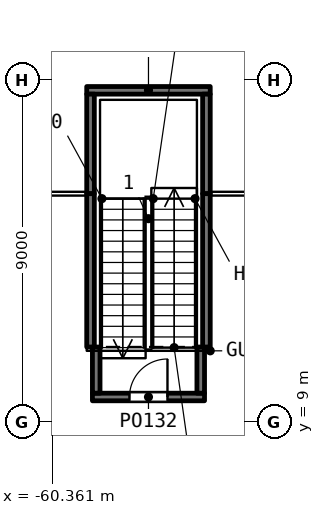
"""IFC4 building model, lengths in metres.
Left out: names, types, materials, properties, quantities, classifications, styles, units other than length and angle.
Written with IfcOpenShell. Run it as: python <this file> out.ifc"""

import sys

from ifc_helpers import new_model, si_unit, direction, frame, frame_2d, origin, place, context, subcontext, project, spatial, rectangle, extrude, element, fill, save


model = new_model("IFC4")
c1 = context("Model", 3, precision=1e-05, world=origin(), true_north=direction((0.0, 1.0)))
c2 = subcontext(c1, "Body", "Model", "MODEL_VIEW")
j1 = project(units=[si_unit("LENGTHUNIT", "METRE"), si_unit("PLANEANGLEUNIT", "RADIAN")], contexts=[c1])
p1 = place(None, origin())
s1 = spatial("IfcSite", under=j1, at=p1, CompositionType="ELEMENT")
p2 = place(p1, origin())
s2 = spatial("IfcBuilding", under=s1, at=p2, CompositionType="ELEMENT")
p3 = place(p2, frame((0.0, 0.0, 7.2)))
s3 = spatial("IfcBuildingStorey", under=s2, at=p3, CompositionType="ELEMENT", Elevation=7.2)
p4 = place(p3, frame((-59.45, 17.72, 0.0), z_axis=(0.0, 0.0, 1.0), x_axis=(1.0, 0.0, 0.0)))
e1 = element("IfcWall", 1, at=p4, inside=s3, PredefinedType="SOLIDWALL", context=c2, shape_type="SweptSolid", body=[
    extrude(rectangle(XDim=3.25, YDim=0.2, at=frame_2d((1.625, 0.0))), origin(), (0.0, 0.0, 1.0), 5.1),
])
for number, where, z_axis, x_axis in (
    (2, (-59.35, 15.0, 0.0), (0.0, 0.0, 1.0), (0.0, 1.0, 0.0)),
    (3, (-56.3, 15.0, 0.0), (0.0, 0.0, 1.0), (0.0, 1.0, 0.0)),
):
    element("IfcWall", number, at=place(p3, frame(where, z_axis=z_axis, x_axis=x_axis)), inside=s3, PredefinedType="SOLIDWALL", context=c2, shape_type="SweptSolid", body=[
        extrude(rectangle(XDim=2.62, YDim=0.2, at=frame_2d((1.31, 0.0))), origin(), (0.0, 0.0, 1.0), 5.1),
    ])
p5 = place(p3, frame((-59.3, 9.65, 0.0), z_axis=(0.0, 0.0, 1.0), x_axis=(1.0, 0.0, 0.0)))
e4 = element("IfcWall", 4, at=p5, inside=s3, PredefinedType="SOLIDWALL", context=c2, shape_type="SweptSolid", body=[
    extrude(rectangle(XDim=2.95, YDim=0.2, at=frame_2d((1.475, 0.0))), origin(), (0.0, 0.0, 1.0), 5.1),
])
p6 = place(p5, frame((0.975, 0.0, 0.0)))
e5 = element("IfcOpeningElement", 5, at=p6, cuts=e4, PredefinedType="OPENING", context=c2, shape_type="SweptSolid", body=[
    extrude(rectangle(XDim=1.0, YDim=2.1, at=frame_2d((0.5, 1.05))), frame((0.0, 0.11, 0.0), z_axis=(0.0, -1.0, 0.0), x_axis=(1.0, 0.0, 0.0)), (0.0, 0.0, 1.0), 0.22),
])
p7 = place(p3, frame((-59.35, 10.965, 0.0), z_axis=(0.0, 0.0, 1.0), x_axis=(0.0, 1.0, 0.0)))
e6 = element("IfcWall", 6, at=p7, inside=s3, PredefinedType="SOLIDWALL", context=c2, shape_type="SweptSolid", body=[
    extrude(rectangle(XDim=4.035, YDim=0.2, at=frame_2d((2.018, 0.0))), origin(), (0.0, 0.0, 1.0), 5.1),
])
for number, where, z_axis, x_axis in (
    (7, (-59.2, 9.75, 0.0), (0.0, 0.0, 1.0), (0.0, 1.0, 0.0)),
    (8, (-56.45, 9.75, 0.0), (0.0, 0.0, 1.0), (0.0, 1.0, 0.0)),
):
    element("IfcWall", number, at=place(p3, frame(where, z_axis=z_axis, x_axis=x_axis)), inside=s3, PredefinedType="SOLIDWALL", context=c2, shape_type="SweptSolid", body=[
        extrude(rectangle(XDim=1.215, YDim=0.2, at=frame_2d((0.607, 0.0))), origin(), (0.0, 0.0, 1.0), 5.1),
    ])
p8 = place(p3, frame((-56.3, 10.965, 0.0), z_axis=(0.0, 0.0, 1.0), x_axis=(0.0, 1.0, 0.0)))
e9 = element("IfcWall", 9, at=p8, inside=s3, PredefinedType="SOLIDWALL", context=c2, shape_type="SweptSolid", body=[
    extrude(rectangle(XDim=4.035, YDim=0.2, at=frame_2d((2.018, 0.0))), origin(), (0.0, 0.0, 1.0), 5.1),
])
p9 = place(p3, frame((-69.6, 15.0, 0.0), z_axis=(0.0, 0.0, 1.0), x_axis=(1.0, 0.0, 0.0)))
e10 = element("IfcWall", 10, at=p9, inside=s3, PredefinedType="PARTITIONING", context=c2, shape_type="SweptSolid", body=[
    extrude(rectangle(XDim=10.15, YDim=0.1, at=frame_2d((5.075, 0.0))), origin(), (0.0, 0.0, 1.0), 5.1),
])
p10 = place(p3, frame((-56.2, 15.0, 0.0), z_axis=(0.0, 0.0, 1.0), x_axis=(1.0, 0.0, 0.0)))
e11 = element("IfcWall", 11, at=p10, inside=s3, PredefinedType="PARTITIONING", context=c2, shape_type="SweptSolid", body=[
    extrude(rectangle(XDim=20.2, YDim=0.1, at=frame_2d((10.1, 0.0))), origin(), (0.0, 0.0, 1.0), 5.1),
])
p11 = place(p10, frame((9.2, 0.0, 0.0)))
e12 = element("IfcOpeningElement", 12, at=p11, cuts=e11, PredefinedType="OPENING", context=c2, shape_type="SweptSolid", body=[
    extrude(rectangle(XDim=1.8, YDim=2.1, at=frame_2d((0.9, 1.05))), frame((0.0, 0.06, 0.0), z_axis=(0.0, -1.0, 0.0), x_axis=(1.0, 0.0, 0.0)), (0.0, 0.0, 1.0), 0.12),
])
p12 = place(p6, origin())
e13 = element("IfcDoor", 13, at=p12, inside=s3, OperationType="SINGLE_SWING_RIGHT", PredefinedType="DOOR", context=c2, shape_type="SweptSolid", body=[
    extrude(rectangle(XDim=1.0, YDim=2.1, at=frame_2d((0.5, 1.05))), frame((0.0, 0.025, 0.0), z_axis=(0.0, -1.0, 0.0), x_axis=(1.0, 0.0, 0.0)), (0.0, 0.0, 1.0), 0.05),
])
fill(e5, e13)
save(model, sys.argv[1])
